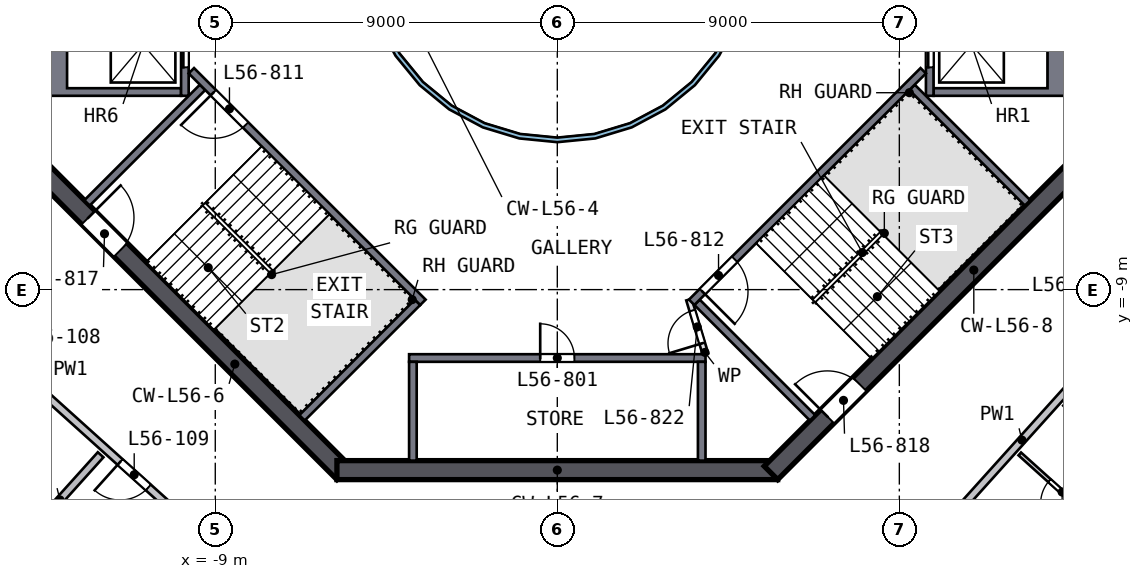
"""IFC4 building model, lengths in metres.
Left out: names, types, materials, properties, quantities, classifications, styles, units other than length and angle.
Written with IfcOpenShell. Run it as: python <this file> out.ifc"""

import sys

from ifc_helpers import new_model, si_unit, direction, frame, frame_2d, origin, place, context, subcontext, project, spatial, polyline, rectangle, outline, extrude, element, fill, save


model = new_model("IFC4")
c1 = context("Model", 3, precision=1e-05, world=origin(), true_north=direction((0.0, 1.0)))
c2 = subcontext(c1, "Body", "Model", "MODEL_VIEW")
j1 = project(units=[si_unit("LENGTHUNIT", "METRE"), si_unit("PLANEANGLEUNIT", "RADIAN")], contexts=[c1])
p1 = place(None, origin())
s1 = spatial("IfcSite", under=j1, at=p1, CompositionType="ELEMENT")
p2 = place(p1, origin())
s2 = spatial("IfcBuilding", under=s1, at=p2, CompositionType="ELEMENT")
p3 = place(p2, frame((0.0, 0.0, 230.5)))
s3 = spatial("IfcBuildingStorey", under=s2, at=p3, CompositionType="ELEMENT", Elevation=230.5)
p4 = place(p3, frame((-13.823, -5.622, 0.0), z_axis=(0.0, 0.0, 1.0), x_axis=(0.707106781, -0.707106781, 0.0)))
e1 = element("IfcWall", 1, at=p4, inside=s3, PredefinedType="SHEAR", context=c2, shape_type="SweptSolid", body=[
    extrude(rectangle(XDim=11.598, YDim=0.5, at=frame_2d((5.799, 0.0))), origin(), (0.0, 0.0, 1.0), 3.5),
])
p5 = place(p4, frame((2.099, 0.0, 0.0)))
e2 = element("IfcOpeningElement", 2, at=p5, cuts=e1, PredefinedType="OPENING", context=c2, shape_type="SweptSolid", body=[
    extrude(rectangle(XDim=1.2, YDim=2.1, at=frame_2d((0.6, 1.05))), frame((0.0, 0.26, 0.0), z_axis=(0.0, -1.0, 0.0), x_axis=(1.0, 0.0, 0.0)), (0.0, 0.0, 1.0), 0.52),
])
p6 = place(p3, frame((-5.799, -13.75, 0.0), z_axis=(0.0, 0.0, 1.0), x_axis=(1.0, 0.0, 0.0)))
e3 = element("IfcWall", 3, at=p6, inside=s3, PredefinedType="SHEAR", context=c2, shape_type="SweptSolid", body=[
    extrude(rectangle(XDim=11.598, YDim=0.5, at=frame_2d((5.799, 0.0))), origin(), (0.0, 0.0, 1.0), 3.5),
])
p7 = place(p3, frame((5.622, -13.823, 0.0), z_axis=(0.0, 0.0, 1.0), x_axis=(0.707106781, 0.707106781, 0.0)))
e4 = element("IfcWall", 4, at=p7, inside=s3, PredefinedType="SHEAR", context=c2, shape_type="SweptSolid", body=[
    extrude(rectangle(XDim=11.598, YDim=0.5, at=frame_2d((5.799, 0.0))), origin(), (0.0, 0.0, 1.0), 3.5),
])
p8 = place(p7, frame((2.099, 0.0, 0.0)))
e5 = element("IfcOpeningElement", 5, at=p8, cuts=e4, PredefinedType="OPENING", context=c2, shape_type="SweptSolid", body=[
    extrude(rectangle(XDim=1.2, YDim=2.1, at=frame_2d((0.6, 1.05))), frame((0.0, 0.26, 0.0), z_axis=(0.0, -1.0, 0.0), x_axis=(1.0, 0.0, 0.0)), (0.0, 0.0, 1.0), 0.52),
])
p9 = place(p3, origin())
e6 = element("IfcWall", 6, at=p9, inside=s3, PredefinedType="SOLIDWALL", context=c2, shape_type="SweptSolid", body=[
    extrude(outline(polyline([(13.5, -3.9), (9.9, -3.9), (9.9, -3.7), (12.9, -3.7), (12.9, -1.4), (9.9, -1.4), (9.9, -1.2), (13.5, -1.2), (13.5, -3.9)])), origin(), (0.0, 0.0, 1.0), 3.19),
])
p10 = place(p3, frame((9.8, -1.2, 0.0), z_axis=(0.0, 0.0, 1.0), x_axis=(0.0, -1.0, 0.0)))
e7 = element("IfcWall", 7, at=p10, inside=s3, PredefinedType="SOLIDWALL", context=c2, shape_type="SweptSolid", body=[
    extrude(rectangle(XDim=2.7, YDim=0.2, at=frame_2d((1.35, 0.0))), origin(), (0.0, 0.0, 1.0), 3.19),
])
p11 = place(p10, frame((0.75, 0.0, 0.0)))
e8 = element("IfcOpeningElement", 8, at=p11, cuts=e7, PredefinedType="OPENING", context=c2, shape_type="SweptSolid", body=[
    extrude(rectangle(XDim=1.2, YDim=2.1, at=frame_2d((0.6, 1.05))), frame((0.0, 0.11, 0.0), z_axis=(0.0, -1.0, 0.0), x_axis=(1.0, 0.0, 0.0)), (0.0, 0.0, 1.0), 0.22),
])
p12 = place(p3, origin())
e9 = element("IfcWall", 9, at=p12, inside=s3, PredefinedType="SOLIDWALL", context=c2, shape_type="SweptSolid", body=[
    extrude(outline(polyline([(-13.5, -3.9), (-13.5, -1.2), (-9.9, -1.2), (-9.9, -1.4), (-12.9, -1.4), (-12.9, -3.7), (-9.9, -3.7), (-9.9, -3.9), (-13.5, -3.9)])), origin(), (0.0, 0.0, 1.0), 3.19),
])
p13 = place(p3, frame((-9.8, -1.2, 0.0), z_axis=(0.0, 0.0, 1.0), x_axis=(0.0, -1.0, 0.0)))
e10 = element("IfcWall", 10, at=p13, inside=s3, PredefinedType="SOLIDWALL", context=c2, shape_type="SweptSolid", body=[
    extrude(rectangle(XDim=2.7, YDim=0.2, at=frame_2d((1.35, 0.0))), origin(), (0.0, 0.0, 1.0), 3.19),
])
p14 = place(p13, frame((0.75, 0.0, 0.0)))
e11 = element("IfcOpeningElement", 11, at=p14, cuts=e10, PredefinedType="OPENING", context=c2, shape_type="SweptSolid", body=[
    extrude(rectangle(XDim=1.2, YDim=2.1, at=frame_2d((0.6, 1.05))), frame((0.0, 0.11, 0.0), z_axis=(0.0, -1.0, 0.0), x_axis=(1.0, 0.0, 0.0)), (0.0, 0.0, 1.0), 0.22),
])
p15 = place(p3, frame((-3.9, -10.8, 0.0), z_axis=(0.0, 0.0, 1.0), x_axis=(1.0, 0.0, 0.0)))
e12 = element("IfcWall", 12, at=p15, inside=s3, PredefinedType="SOLIDWALL", context=c2, shape_type="SweptSolid", body=[
    extrude(rectangle(XDim=7.8, YDim=0.2, at=frame_2d((3.9, 0.0))), origin(), (0.0, 0.0, 1.0), 3.19),
])
p16 = place(p15, frame((3.45, 0.0, 0.0)))
e13 = element("IfcOpeningElement", 13, at=p16, cuts=e12, PredefinedType="OPENING", context=c2, shape_type="SweptSolid", body=[
    extrude(rectangle(XDim=0.9, YDim=2.1, at=frame_2d((0.45, 1.05))), frame((0.0, 0.11, 0.0), z_axis=(0.0, -1.0, 0.0), x_axis=(1.0, 0.0, 0.0)), (0.0, 0.0, 1.0), 0.22),
])
for number, where, z_axis, x_axis in (
    (14, (-3.8, -10.9, 0.0), (0.0, 0.0, 1.0), (0.0, -1.0, 0.0)),
    (15, (3.8, -10.9, 0.0), (0.0, 0.0, 1.0), (0.0, -1.0, 0.0)),
):
    element("IfcWall", number, at=place(p3, frame(where, z_axis=z_axis, x_axis=x_axis)), inside=s3, PredefinedType="SOLIDWALL", context=c2, shape_type="SweptSolid", body=[
        extrude(rectangle(XDim=2.6, YDim=0.2, at=frame_2d((1.3, 0.0))), origin(), (0.0, 0.0, 1.0), 3.19),
    ])
p17 = place(p3, frame((-3.535, -9.334, 0.0), z_axis=(0.0, 0.0, 1.0), x_axis=(-0.707120946, 0.707092617, 0.0)))
e16 = element("IfcWall", 16, at=p17, inside=s3, PredefinedType="SOLIDWALL", context=c2, shape_type="SweptSolid", body=[
    extrude(rectangle(XDim=8.618, YDim=0.2, at=frame_2d((4.309, 0.0))), origin(), (0.0, 0.0, 1.0), 3.19),
])
p18 = place(p17, frame((6.6, 0.0, 0.0)))
e17 = element("IfcOpeningElement", 17, at=p18, cuts=e16, PredefinedType="OPENING", context=c2, shape_type="SweptSolid", body=[
    extrude(rectangle(XDim=1.2, YDim=2.1, at=frame_2d((0.6, 1.05))), frame((0.0, 0.11, 0.0), z_axis=(0.0, -1.0, 0.0), x_axis=(1.0, 0.0, 0.0)), (0.0, 0.0, 1.0), 0.22),
])
for number, where, z_axis, x_axis in (
    (18, (-9.334, -3.677, 0.0), (0.0, 0.0, 1.0), (-0.707, -0.707, 0.0)),
    (19, (-3.677, -9.334, 0.0), (0.0, 0.0, 1.0), (-0.707, -0.707, 0.0)),
):
    element("IfcWall", number, at=place(p3, frame(where, z_axis=z_axis, x_axis=x_axis)), inside=s3, PredefinedType="SOLIDWALL", context=c2, shape_type="SweptSolid", body=[
        extrude(rectangle(XDim=4.3, YDim=0.2, at=frame_2d((2.15, 0.0))), origin(), (0.0, 0.0, 1.0), 3.19),
    ])
p19 = place(p3, frame((9.629, -3.24, 0.0), z_axis=(0.0, 0.0, 1.0), x_axis=(-0.707120946, -0.707092617, 0.0)))
e20 = element("IfcWall", 20, at=p19, inside=s3, PredefinedType="SOLIDWALL", context=c2, shape_type="SweptSolid", body=[
    extrude(rectangle(XDim=8.618, YDim=0.2, at=frame_2d((4.309, 0.0))), origin(), (0.0, 0.0, 1.0), 3.19),
])
p20 = place(p19, frame((7.018, 0.0, 0.0)))
e21 = element("IfcOpeningElement", 21, at=p20, cuts=e20, PredefinedType="OPENING", context=c2, shape_type="SweptSolid", body=[
    extrude(rectangle(XDim=1.2, YDim=2.1, at=frame_2d((0.6, 1.05))), frame((0.0, 0.11, 0.0), z_axis=(0.0, -1.0, 0.0), x_axis=(1.0, 0.0, 0.0)), (0.0, 0.0, 1.0), 0.22),
])
for number, where, z_axis, x_axis in (
    (22, (3.677, -9.334, 0.0), (0.0, 0.0, 1.0), (0.707, -0.707, 0.0)),
    (23, (9.334, -3.677, 0.0), (0.0, 0.0, 1.0), (0.707, -0.707, 0.0)),
):
    element("IfcWall", number, at=place(p3, frame(where, z_axis=z_axis, x_axis=x_axis)), inside=s3, PredefinedType="SOLIDWALL", context=c2, shape_type="SweptSolid", body=[
        extrude(rectangle(XDim=4.3, YDim=0.2, at=frame_2d((2.15, 0.0))), origin(), (0.0, 0.0, 1.0), 3.19),
    ])
p21 = place(p3, frame((3.9, -10.7, 0.0), z_axis=(0.0, 0.0, 1.0), x_axis=(-0.289808785, 0.957084567, 0.0)))
e24 = element("IfcWall", 24, at=p21, inside=s3, PredefinedType="PARTITIONING", context=c2, shape_type="SweptSolid", body=[
    extrude(rectangle(XDim=1.501, YDim=0.15, at=frame_2d((0.75, 0.0))), origin(), (0.0, 0.0, 1.0), 3.19),
])
p22 = place(p21, frame((0.301, 0.0, 0.0)))
e25 = element("IfcOpeningElement", 25, at=p22, cuts=e24, PredefinedType="OPENING", context=c2, shape_type="SweptSolid", body=[
    extrude(rectangle(XDim=0.9, YDim=2.1, at=frame_2d((0.45, 1.05))), frame((0.0, 0.085, 0.0), z_axis=(0.0, -1.0, 0.0), x_axis=(1.0, 0.0, 0.0)), (0.0, 0.0, 1.0), 0.17),
])
p23 = place(p3, origin())
e26 = element("IfcWall", 26, at=p23, inside=s3, PredefinedType="SOLIDWALL", context=c2, shape_type="SweptSolid", body=[
    extrude(outline(polyline([(5.021, -0.999), (4.73, -1.959), (4.257, -2.844), (3.62, -3.62), (2.844, -4.257), (1.959, -4.73), (0.999, -5.021), (0.0, -5.12), (-0.999, -5.021), (-1.959, -4.73), (-2.844, -4.257), (-3.62, -3.62), (-4.257, -2.844), (-4.73, -1.959), (-5.021, -0.999), (-5.12, 0.0), (-5.021, 0.999), (-4.73, 1.959), (-4.257, 2.844), (-3.62, 3.62), (-2.844, 4.257), (-1.959, 4.73), (-0.999, 5.021), (0.0, 5.12), (0.999, 5.021), (1.959, 4.73), (2.844, 4.257), (3.62, 3.62), (4.257, 2.844), (4.73, 1.959), (5.021, 0.999), (5.12, 0.0), (5.021, -0.999)]), holes=[polyline([(4.904, 0.976), (4.619, 1.913), (4.157, 2.778), (3.535, 3.535), (2.778, 4.157), (1.913, 4.619), (0.976, 4.904), (0.0, 5.0), (-0.976, 4.904), (-1.913, 4.619), (-2.778, 4.157), (-3.535, 3.535), (-4.157, 2.778), (-4.619, 1.913), (-4.904, 0.976), (-5.0, 0.0), (-4.904, -0.976), (-4.619, -1.913), (-4.157, -2.778), (-3.535, -3.535), (-2.778, -4.157), (-1.913, -4.619), (-0.976, -4.904), (0.0, -5.0), (0.976, -4.904), (1.913, -4.619), (2.778, -4.157), (3.535, -3.535), (4.157, -2.778), (4.619, -1.913), (4.904, -0.976), (5.0, 0.0), (4.904, 0.976)])]), origin(), (0.0, 0.0, 1.0), 3.19),
])
p24 = place(p3, frame((-8.495, -16.247, 0.0), z_axis=(0.0, 0.0, 1.0), x_axis=(-0.743147652, 0.669127468, 0.0)))
e27 = element("IfcWall", 27, at=p24, inside=s3, PredefinedType="SOLIDWALL", context=c2, shape_type="SweptSolid", body=[
    extrude(rectangle(XDim=9.116, YDim=0.2, at=frame_2d((4.558, 0.0))), origin(), (0.0, 0.0, 1.0), 3.19),
])
p25 = place(p24, frame((3.05, 0.0, 0.0)))
e28 = element("IfcOpeningElement", 28, at=p25, cuts=e27, PredefinedType="OPENING", context=c2, shape_type="SweptSolid", body=[
    extrude(rectangle(XDim=1.0, YDim=2.1, at=frame_2d((0.5, 1.05))), frame((0.0, 0.11, 0.0), z_axis=(0.0, -1.0, 0.0), x_axis=(1.0, 0.0, 0.0)), (0.0, 0.0, 1.0), 0.22),
])
p26 = place(p3, frame((16.247, -8.495, 0.0), z_axis=(0.0, 0.0, 1.0), x_axis=(-0.669127468, -0.743147652, 0.0)))
e29 = element("IfcWall", 29, at=p26, inside=s3, PredefinedType="SOLIDWALL", context=c2, shape_type="SweptSolid", body=[
    extrude(rectangle(XDim=9.116, YDim=0.2, at=frame_2d((4.558, 0.0))), origin(), (0.0, 0.0, 1.0), 3.19),
])
p27 = place(p26, frame((1.7, 0.0, 0.0)))
e30 = element("IfcOpeningElement", 30, at=p27, cuts=e29, PredefinedType="OPENING", context=c2, shape_type="SweptSolid", body=[
    extrude(rectangle(XDim=1.0, YDim=2.1, at=frame_2d((0.5, 1.05))), frame((0.0, 0.11, 0.0), z_axis=(0.0, -1.0, 0.0), x_axis=(1.0, 0.0, 0.0)), (0.0, 0.0, 1.0), 0.22),
])
p28 = place(p3, frame((-12.017, -13.346, 0.0), z_axis=(0.0, 0.0, 1.0), x_axis=(-0.669133329, -0.743142374, 0.0)))
e31 = element("IfcWall", 31, at=p28, inside=s3, PredefinedType="SOLIDWALL", context=c2, shape_type="SweptSolid", body=[
    extrude(rectangle(XDim=3.2, YDim=0.2, at=frame_2d((1.6, 0.0))), origin(), (0.0, 0.0, 1.0), 3.19),
])
p29 = place(p3, frame((14.473, -15.397, 0.0), z_axis=(0.0, 0.0, 1.0), x_axis=(-0.74315315, 0.669121361, 0.0)))
e32 = element("IfcWall", 32, at=p29, inside=s3, PredefinedType="PARTITIONING", context=c2, shape_type="SweptSolid", body=[
    extrude(rectangle(XDim=3.1, YDim=0.1, at=frame_2d((1.55, 0.0))), origin(), (0.0, 0.0, 1.0), 3.19),
])
p30 = place(p29, frame((1.15, 0.0, 0.0)))
e33 = element("IfcOpeningElement", 33, at=p30, cuts=e32, PredefinedType="OPENING", context=c2, shape_type="SweptSolid", body=[
    extrude(rectangle(XDim=0.9, YDim=2.1, at=frame_2d((0.45, 1.05))), frame((0.0, 0.06, 0.0), z_axis=(0.0, -1.0, 0.0), x_axis=(1.0, 0.0, 0.0)), (0.0, 0.0, 1.0), 0.12),
])
p31 = place(p16, origin())
e34 = element("IfcDoor", 34, at=p31, inside=s3, OperationType="SINGLE_SWING_LEFT", PredefinedType="DOOR", context=c2, shape_type="SweptSolid", body=[
    extrude(rectangle(XDim=0.9, YDim=2.1, at=frame_2d((0.45, 1.05))), frame((0.0, 0.025, 0.0), z_axis=(0.0, -1.0, 0.0), x_axis=(1.0, 0.0, 0.0)), (0.0, 0.0, 1.0), 0.05),
])
fill(e13, e34)
p32 = place(p11, origin())
e35 = element("IfcDoor", 35, at=p32, inside=s3, OperationType="DOUBLE_DOOR_SLIDING", PredefinedType="DOOR", context=c2, shape_type="SweptSolid", body=[
    extrude(rectangle(XDim=1.2, YDim=2.1, at=frame_2d((0.6, 1.05))), frame((0.0, 0.025, 0.0), z_axis=(0.0, -1.0, 0.0), x_axis=(1.0, 0.0, 0.0)), (0.0, 0.0, 1.0), 0.05),
])
fill(e8, e35)
p33 = place(p14, origin())
e36 = element("IfcDoor", 36, at=p33, inside=s3, OperationType="DOUBLE_DOOR_SLIDING", PredefinedType="DOOR", context=c2, shape_type="SweptSolid", body=[
    extrude(rectangle(XDim=1.2, YDim=2.1, at=frame_2d((0.6, 1.05))), frame((0.0, 0.025, 0.0), z_axis=(0.0, -1.0, 0.0), x_axis=(1.0, 0.0, 0.0)), (0.0, 0.0, 1.0), 0.05),
])
fill(e11, e36)
p34 = place(p18, origin())
e37 = element("IfcDoor", 37, at=p34, inside=s3, OperationType="SINGLE_SWING_RIGHT", PredefinedType="DOOR", context=c2, shape_type="SweptSolid", body=[
    extrude(rectangle(XDim=1.2, YDim=2.1, at=frame_2d((0.6, 1.05))), frame((0.0, 0.025, 0.0), z_axis=(0.0, -1.0, 0.0), x_axis=(1.0, 0.0, 0.0)), (0.0, 0.0, 1.0), 0.05),
])
fill(e17, e37)
p35 = place(p20, origin())
e38 = element("IfcDoor", 38, at=p35, inside=s3, OperationType="SINGLE_SWING_RIGHT", PredefinedType="DOOR", context=c2, shape_type="SweptSolid", body=[
    extrude(rectangle(XDim=1.2, YDim=2.1, at=frame_2d((0.6, 1.05))), frame((0.0, 0.025, 0.0), z_axis=(0.0, -1.0, 0.0), x_axis=(1.0, 0.0, 0.0)), (0.0, 0.0, 1.0), 0.05),
])
fill(e21, e38)
p36 = place(p5, origin())
e39 = element("IfcDoor", 39, at=p36, inside=s3, OperationType="SINGLE_SWING_LEFT", PredefinedType="DOOR", context=c2, shape_type="SweptSolid", body=[
    extrude(rectangle(XDim=1.2, YDim=2.1, at=frame_2d((0.6, 1.05))), frame((0.0, 0.025, 0.0), z_axis=(0.0, -1.0, 0.0), x_axis=(1.0, 0.0, 0.0)), (0.0, 0.0, 1.0), 0.05),
])
fill(e2, e39)
p37 = place(p8, origin())
e40 = element("IfcDoor", 40, at=p37, inside=s3, OperationType="SINGLE_SWING_LEFT", PredefinedType="DOOR", context=c2, shape_type="SweptSolid", body=[
    extrude(rectangle(XDim=1.2, YDim=2.1, at=frame_2d((0.6, 1.05))), frame((0.0, 0.025, 0.0), z_axis=(0.0, -1.0, 0.0), x_axis=(1.0, 0.0, 0.0)), (0.0, 0.0, 1.0), 0.05),
])
fill(e5, e40)
p38 = place(p22, origin())
e41 = element("IfcDoor", 41, at=p38, inside=s3, OperationType="SINGLE_SWING_LEFT", PredefinedType="DOOR", context=c2, shape_type="SweptSolid", body=[
    extrude(rectangle(XDim=0.9, YDim=2.1, at=frame_2d((0.45, 1.05))), frame((0.0, 0.025, 0.0), z_axis=(0.0, -1.0, 0.0), x_axis=(1.0, 0.0, 0.0)), (0.0, 0.0, 1.0), 0.05),
])
fill(e25, e41)
p39 = place(p25, origin())
e42 = element("IfcDoor", 42, at=p39, inside=s3, OperationType="SINGLE_SWING_RIGHT", PredefinedType="DOOR", context=c2, shape_type="SweptSolid", body=[
    extrude(rectangle(XDim=1.0, YDim=2.1, at=frame_2d((0.5, 1.05))), frame((0.0, 0.025, 0.0), z_axis=(0.0, -1.0, 0.0), x_axis=(1.0, 0.0, 0.0)), (0.0, 0.0, 1.0), 0.05),
])
fill(e28, e42)
p40 = place(p30, origin())
e43 = element("IfcDoor", 43, at=p40, inside=s3, OperationType="SINGLE_SWING_LEFT", PredefinedType="DOOR", context=c2, shape_type="SweptSolid", body=[
    extrude(rectangle(XDim=0.9, YDim=2.1, at=frame_2d((0.45, 1.05))), frame((0.0, 0.025, 0.0), z_axis=(0.0, -1.0, 0.0), x_axis=(1.0, 0.0, 0.0)), (0.0, 0.0, 1.0), 0.05),
])
fill(e33, e43)
save(model, sys.argv[1])
